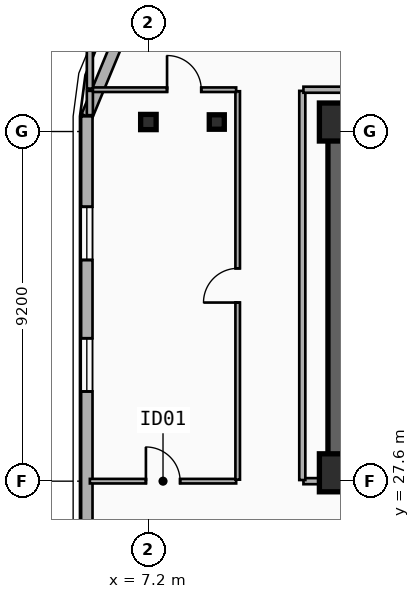
"""IFC4 building model, lengths in metres.
Left out: names, types, materials, properties, quantities, classifications, styles, units other than length and angle.
Written with IfcOpenShell. Run it as: python <this file> out.ifc"""

import sys

from ifc_helpers import new_model, si_unit, direction, frame, frame_2d, origin, origin_2d, place, context, subcontext, project, spatial, rectangle, i_section, extrude, element, fill, save


model = new_model("IFC4")
c1 = context("Model", 3, precision=1e-05, world=origin(), true_north=direction((0.0, 1.0)))
c2 = subcontext(c1, "Body", "Model", "MODEL_VIEW")
j1 = project(units=[si_unit("LENGTHUNIT", "METRE"), si_unit("PLANEANGLEUNIT", "RADIAN")], contexts=[c1])
p1 = place(None, origin())
s1 = spatial("IfcSite", under=j1, at=p1, CompositionType="ELEMENT")
p2 = place(p1, origin())
s2 = spatial("IfcBuilding", under=s1, at=p2, CompositionType="ELEMENT")
p3 = place(p2, frame((0.0, 0.0, 240.0)))
s3 = spatial("IfcBuildingStorey", under=s2, at=p3, CompositionType="ELEMENT", Elevation=240.0)
p4 = place(p3, frame((12.15, 37.05, 0.0), z_axis=(0.0, 0.0, 1.0), x_axis=(1.0, 0.0, 0.0)))
e1 = element("IfcWall", 1, at=p4, inside=s3, PredefinedType="SHEAR", context=c2, shape_type="SweptSolid", body=[
    extrude(rectangle(XDim=33.23, YDim=0.45, at=frame_2d((16.615, 0.0))), origin(), (0.0, 0.0, 1.0), 3.6),
])
p5 = place(p3, frame((21.18, 27.82, 0.0), z_axis=(0.0, 0.0, 1.0), x_axis=(-1.0, 0.0, 0.0)))
e2 = element("IfcWall", 2, at=p5, inside=s3, PredefinedType="SHEAR", context=c2, shape_type="SweptSolid", body=[
    extrude(rectangle(XDim=9.03, YDim=0.45, at=frame_2d((4.515, 0.0))), origin(), (0.0, 0.0, 1.0), 3.6),
])
p6 = place(p5, frame((2.68, 0.0, 0.0)))
e3 = element("IfcOpeningElement", 3, at=p6, cuts=e2, PredefinedType="OPENING", context=c2, shape_type="SweptSolid", body=[
    extrude(rectangle(XDim=1.1, YDim=2.15, at=frame_2d((0.55, 1.075))), frame((0.0, 0.235, 0.0), z_axis=(0.0, -1.0, 0.0), x_axis=(1.0, 0.0, 0.0)), (0.0, 0.0, 1.0), 0.47),
])
p7 = place(p3, frame((12.15, 28.045, 0.0), z_axis=(0.0, 0.0, 1.0), x_axis=(0.0, 1.0, 0.0)))
e4 = element("IfcWall", 4, at=p7, inside=s3, PredefinedType="SHEAR", context=c2, shape_type="SweptSolid", body=[
    extrude(rectangle(XDim=8.78, YDim=0.45, at=frame_2d((4.39, 0.0))), origin(), (0.0, 0.0, 1.0), 3.6),
])
for number, where, z_axis, x_axis in (
    (5, (12.2, 27.82, 0.0), (0.0, 0.0, 1.0), (1.0, 0.0, 0.0)),
    (6, (12.2, 37.05, 0.0), (0.0, 0.0, 1.0), (1.0, 0.0, 0.0)),
):
    element("IfcColumn", number, at=place(p3, frame(where, z_axis=z_axis, x_axis=x_axis)), inside=s3, PredefinedType="COLUMN", context=c2, shape_type="SweptSolid", body=[
        extrude(rectangle(XDim=1.0, YDim=1.0, at=origin_2d()), origin(), (0.0, 0.0, 1.0), 3.6),
    ])
p8 = place(p3, frame((9.0, 37.05, 0.0), z_axis=(0.0, 0.0, 1.0), x_axis=(1.0, 0.0, 0.0)))
e7 = element("IfcColumn", 7, at=p8, inside=s3, PredefinedType="COLUMN", context=c2, shape_type="SweptSolid", body=[
    extrude(i_section(OverallWidth=0.395, OverallDepth=0.38, WebThickness=0.019, FlangeThickness=0.03, FilletRadius=0.015, at=origin_2d()), origin(), (0.0, 0.0, 1.0), 3.6),
])
p9 = place(p3, frame((7.2, 37.05, 0.0), z_axis=(0.0, 0.0, 1.0), x_axis=(1.0, 0.0, 0.0)))
e8 = element("IfcColumn", 8, at=p9, inside=s3, PredefinedType="COLUMN", context=c2, shape_type="SweptSolid", body=[
    extrude(i_section(OverallWidth=0.408, OverallDepth=0.4, WebThickness=0.025, FlangeThickness=0.039, FilletRadius=0.015, at=origin_2d()), origin(), (0.0, 0.0, 1.0), 3.6),
])
p10 = place(p3, frame((5.58, 37.2, 0.0), z_axis=(0.0, 0.0, 1.0), x_axis=(0.382636798336, 0.92389884758, 0.0)))
e9 = element("IfcWall", 9, at=p10, inside=s3, PredefinedType="SOLIDWALL", context=c2, shape_type="SweptSolid", body=[
    extrude(rectangle(XDim=3.077, YDim=0.3, at=frame_2d((1.538, 0.0))), origin(), (0.0, 0.0, 1.0), 3.28),
])
p11 = place(p3, frame((5.58, 8.6, 0.0), z_axis=(0.0, 0.0, 1.0), x_axis=(0.0, 1.0, 0.0)))
e10 = element("IfcWall", 10, at=p11, inside=s3, PredefinedType="SOLIDWALL", context=c2, shape_type="SweptSolid", body=[
    extrude(rectangle(XDim=28.6, YDim=0.3, at=frame_2d((14.3, 0.0))), origin(), (0.0, 0.0, 1.0), 3.28),
])
p12 = place(p11, frame((21.36, 0.0, 0.34)))
e11 = element("IfcOpeningElement", 11, at=p12, cuts=e10, PredefinedType="OPENING", context=c2, shape_type="SweptSolid", body=[
    extrude(rectangle(XDim=1.4, YDim=2.1, at=frame_2d((0.7, 1.05))), frame((0.0, 0.16, 0.0), z_axis=(0.0, -1.0, 0.0), x_axis=(1.0, 0.0, 0.0)), (0.0, 0.0, 1.0), 0.32),
])
p13 = place(p11, frame((24.82, 0.0, 0.34)))
e12 = element("IfcOpeningElement", 12, at=p13, cuts=e10, PredefinedType="OPENING", context=c2, shape_type="SweptSolid", body=[
    extrude(rectangle(XDim=1.4, YDim=2.1, at=frame_2d((0.7, 1.05))), frame((0.0, 0.16, 0.0), z_axis=(0.0, -1.0, 0.0), x_axis=(1.0, 0.0, 0.0)), (0.0, 0.0, 1.0), 0.32),
])
p14 = place(p11, frame((4.797, 0.0, 0.34)))
e13 = element("IfcOpeningElement", 13, at=p14, cuts=e10, PredefinedType="OPENING", context=c2, shape_type="SweptSolid", body=[
    extrude(rectangle(XDim=1.4, YDim=2.1, at=frame_2d((0.7, 1.05))), frame((0.0, 0.16, 0.0), z_axis=(0.0, -1.0, 0.0), x_axis=(1.0, 0.0, 0.0)), (0.0, 0.0, 1.0), 0.32),
])
p15 = place(p11, frame((10.673, 0.0, 0.34)))
e14 = element("IfcOpeningElement", 14, at=p15, cuts=e10, PredefinedType="OPENING", context=c2, shape_type="SweptSolid", body=[
    extrude(rectangle(XDim=1.4, YDim=2.1, at=frame_2d((0.7, 1.05))), frame((0.0, 0.16, 0.0), z_axis=(0.0, -1.0, 0.0), x_axis=(1.0, 0.0, 0.0)), (0.0, 0.0, 1.0), 0.32),
])
p16 = place(p3, frame((5.66, 27.6, 0.0), z_axis=(0.0, 0.0, 1.0), x_axis=(1.0, 0.0, 0.0)))
e15 = element("IfcWall", 15, at=p16, inside=s3, PredefinedType="PARTITIONING", context=c2, shape_type="SweptSolid", body=[
    extrude(rectangle(XDim=3.85, YDim=0.12, at=frame_2d((1.925, 0.0))), origin(), (0.0, 0.0, 1.0), 2.61),
])
p17 = place(p16, frame((1.475, 0.0, 0.0)))
e16 = element("IfcOpeningElement", 16, at=p17, cuts=e15, PredefinedType="OPENING", context=c2, shape_type="SweptSolid", body=[
    extrude(rectangle(XDim=0.9, YDim=2.1, at=frame_2d((0.45, 1.05))), frame((0.0, 0.07, 0.0), z_axis=(0.0, -1.0, 0.0), x_axis=(1.0, 0.0, 0.0)), (0.0, 0.0, 1.0), 0.14),
])
p18 = place(p3, frame((9.55, 27.64, 0.0), z_axis=(0.0, 0.0, 1.0), x_axis=(0.0, 1.0, 0.0)))
e17 = element("IfcWall", 17, at=p18, inside=s3, PredefinedType="PARTITIONING", context=c2, shape_type="SweptSolid", body=[
    extrude(rectangle(XDim=10.22, YDim=0.12, at=frame_2d((5.11, 0.0))), origin(), (0.0, 0.0, 1.0), 2.76),
])
p19 = place(p18, frame((4.66, 0.0, 0.0)))
e18 = element("IfcOpeningElement", 18, at=p19, cuts=e17, PredefinedType="OPENING", context=c2, shape_type="SweptSolid", body=[
    extrude(rectangle(XDim=0.9, YDim=2.1, at=frame_2d((0.45, 1.05))), frame((0.0, 0.07, 0.0), z_axis=(0.0, -1.0, 0.0), x_axis=(1.0, 0.0, 0.0)), (0.0, 0.0, 1.0), 0.14),
])
p20 = place(p3, frame((5.66, 37.9, 0.0), z_axis=(0.0, 0.0, 1.0), x_axis=(1.0, 0.0, 0.0)))
e19 = element("IfcWall", 19, at=p20, inside=s3, PredefinedType="PARTITIONING", context=c2, shape_type="SweptSolid", body=[
    extrude(rectangle(XDim=3.85, YDim=0.12, at=frame_2d((1.925, 0.0))), origin(), (0.0, 0.0, 1.0), 3.28),
])
p21 = place(p20, frame((2.031, 0.0, 0.0)))
e20 = element("IfcOpeningElement", 20, at=p21, cuts=e19, PredefinedType="OPENING", context=c2, shape_type="SweptSolid", body=[
    extrude(rectangle(XDim=0.9, YDim=2.1, at=frame_2d((0.45, 1.05))), frame((0.0, 0.07, 0.0), z_axis=(0.0, -1.0, 0.0), x_axis=(1.0, 0.0, 0.0)), (0.0, 0.0, 1.0), 0.14),
])
p22 = place(p3, frame((11.28, 27.6, 0.0), z_axis=(0.0, 0.0, 1.0), x_axis=(1.0, 0.0, 0.0)))
e21 = element("IfcWall", 21, at=p22, inside=s3, PredefinedType="PARTITIONING", context=c2, shape_type="SweptSolid", body=[
    extrude(rectangle(XDim=0.84, YDim=0.16, at=frame_2d((0.42, 0.0))), origin(), (0.0, 0.0, 1.0), 2.35),
])
p23 = place(p3, frame((11.25, 27.63, 0.0), z_axis=(0.0, 0.0, 1.0), x_axis=(0.0, 1.0, 0.0)))
e22 = element("IfcWall", 22, at=p23, inside=s3, PredefinedType="PARTITIONING", context=c2, shape_type="SweptSolid", body=[
    extrude(rectangle(XDim=10.24, YDim=0.16, at=frame_2d((5.12, 0.0))), origin(), (0.0, 0.0, 1.0), 2.76),
])
p24 = place(p3, frame((11.28, 37.9, 0.0), z_axis=(0.0, 0.0, 1.0), x_axis=(1.0, 0.0, 0.0)))
e23 = element("IfcWall", 23, at=p24, inside=s3, PredefinedType="PARTITIONING", context=c2, shape_type="SweptSolid", body=[
    extrude(rectangle(XDim=35.04, YDim=0.16, at=frame_2d((17.52, 0.0))), origin(), (0.0, 0.0, 1.0), 3.28),
])
p25 = place(p3, frame((5.66, 37.93, 0.0), z_axis=(0.0, 0.0, 1.0), x_axis=(0.0, 1.0, 0.0)))
e24 = element("IfcWall", 24, at=p25, inside=s3, PredefinedType="PARTITIONING", context=c2, shape_type="SweptSolid", body=[
    extrude(rectangle(XDim=1.44, YDim=0.16, at=frame_2d((0.72, 0.0))), origin(), (0.0, 0.0, 1.0), 3.28),
])
p26 = place(p3, frame((5.66, 37.23, 0.0), z_axis=(0.0, 0.0, 1.0), x_axis=(0.0, 1.0, 0.0)))
e25 = element("IfcWall", 25, at=p26, inside=s3, PredefinedType="PARTITIONING", context=c2, shape_type="SweptSolid", body=[
    extrude(rectangle(XDim=0.64, YDim=0.16, at=frame_2d((0.32, 0.0))), origin(), (0.0, 0.0, 1.0), 3.28),
])
p27 = place(p12, origin())
e26 = element("IfcWindow", 26, at=p27, inside=s3, PartitioningType="SINGLE_PANEL", PredefinedType="WINDOW", context=c2, shape_type="SweptSolid", body=[
    extrude(rectangle(XDim=1.4, YDim=2.1, at=frame_2d((0.7, 1.05))), frame((0.0, 0.03, 0.0), z_axis=(0.0, -1.0, 0.0), x_axis=(1.0, 0.0, 0.0)), (0.0, 0.0, 1.0), 0.06),
])
fill(e11, e26)
p28 = place(p13, origin())
e27 = element("IfcWindow", 27, at=p28, inside=s3, PartitioningType="SINGLE_PANEL", PredefinedType="WINDOW", context=c2, shape_type="SweptSolid", body=[
    extrude(rectangle(XDim=1.4, YDim=2.1, at=frame_2d((0.7, 1.05))), frame((0.0, 0.03, 0.0), z_axis=(0.0, -1.0, 0.0), x_axis=(1.0, 0.0, 0.0)), (0.0, 0.0, 1.0), 0.06),
])
fill(e12, e27)
p29 = place(p17, origin())
e28 = element("IfcDoor", 28, at=p29, inside=s3, OperationType="SINGLE_SWING_LEFT", PredefinedType="DOOR", context=c2, shape_type="SweptSolid", body=[
    extrude(rectangle(XDim=0.9, YDim=2.1, at=frame_2d((0.45, 1.05))), frame((0.0, 0.025, 0.0), z_axis=(0.0, -1.0, 0.0), x_axis=(1.0, 0.0, 0.0)), (0.0, 0.0, 1.0), 0.05),
])
fill(e16, e28)
p30 = place(p19, origin())
e29 = element("IfcDoor", 29, at=p30, inside=s3, OperationType="SINGLE_SWING_LEFT", PredefinedType="DOOR", context=c2, shape_type="SweptSolid", body=[
    extrude(rectangle(XDim=0.9, YDim=2.1, at=frame_2d((0.45, 1.05))), frame((0.0, 0.025, 0.0), z_axis=(0.0, -1.0, 0.0), x_axis=(1.0, 0.0, 0.0)), (0.0, 0.0, 1.0), 0.05),
])
fill(e18, e29)
p31 = place(p21, origin())
e30 = element("IfcDoor", 30, at=p31, inside=s3, OperationType="SINGLE_SWING_LEFT", PredefinedType="DOOR", context=c2, shape_type="SweptSolid", body=[
    extrude(rectangle(XDim=0.9, YDim=2.1, at=frame_2d((0.45, 1.05))), frame((0.0, 0.025, 0.0), z_axis=(0.0, -1.0, 0.0), x_axis=(1.0, 0.0, 0.0)), (0.0, 0.0, 1.0), 0.05),
])
fill(e20, e30)
save(model, sys.argv[1])
